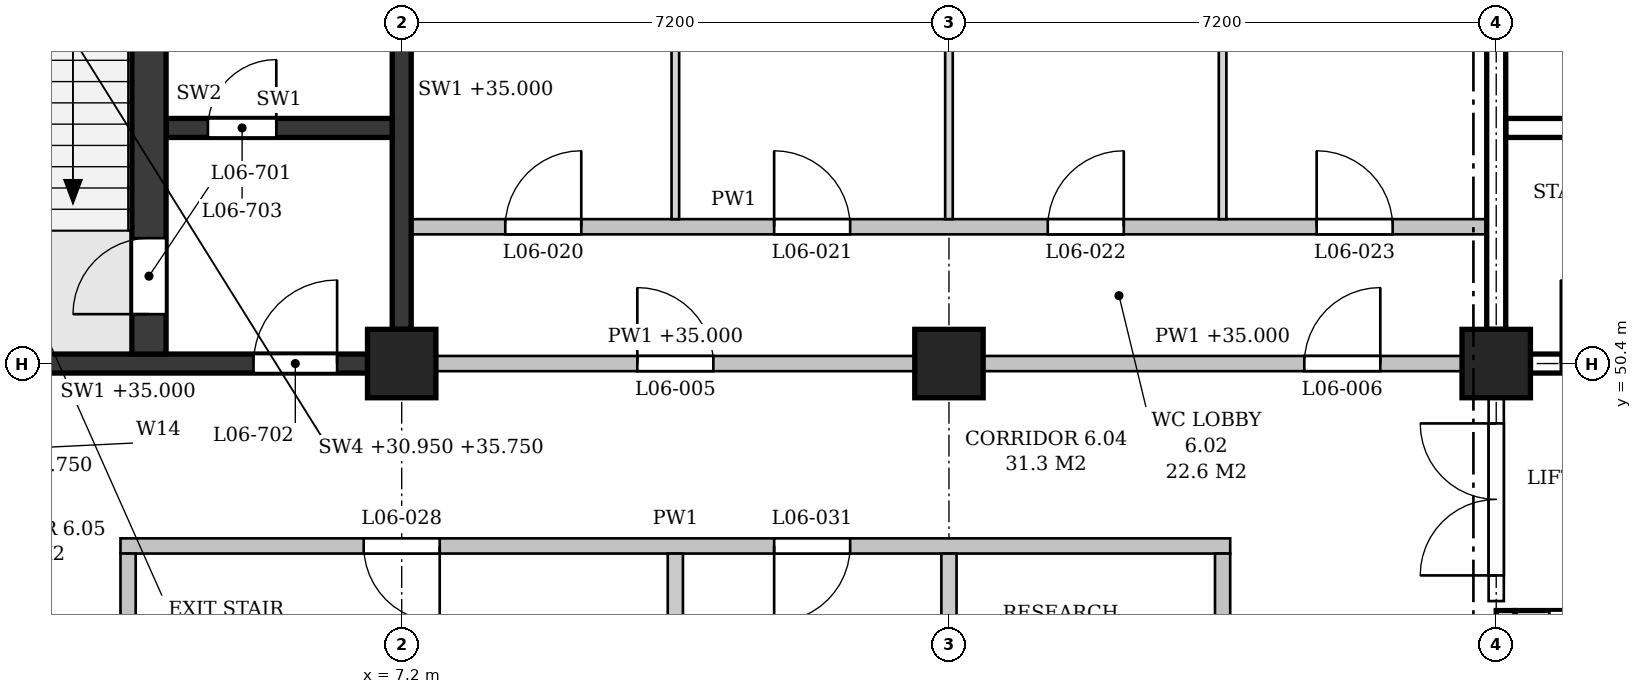
"""IFC4 building model, lengths in metres.
Left out: names, types, materials, properties, quantities, classifications, styles, units other than length and angle.
Written with IfcOpenShell. Run it as: python <this file> out.ifc"""

import sys

from ifc_helpers import new_model, si_unit, direction, frame, frame_2d, origin, origin_2d, place, context, subcontext, project, spatial, polyline, rectangle, outline, extrude, element, fill, save


model = new_model("IFC4")
c1 = context("Model", 3, precision=1e-05, world=origin(), true_north=direction((0.0, 1.0)))
c2 = subcontext(c1, "Body", "Model", "MODEL_VIEW")
j1 = project(units=[si_unit("LENGTHUNIT", "METRE"), si_unit("PLANEANGLEUNIT", "RADIAN")], contexts=[c1])
p1 = place(None, origin())
s1 = spatial("IfcSite", under=j1, at=p1, CompositionType="ELEMENT")
p2 = place(p1, origin())
s2 = spatial("IfcBuilding", under=s1, at=p2, CompositionType="ELEMENT")
p3 = place(p2, frame((0.0, 0.0, 31.2)))
s3 = spatial("IfcBuildingStorey", under=s2, at=p3, CompositionType="ELEMENT", Elevation=31.2)
for number, where, z_axis, x_axis in (
    (1, (7.2, 50.4, 0.0), (0.0, 0.0, 1.0), (1.0, 0.0, 0.0)),
    (2, (14.4, 50.4, 0.0), (0.0, 0.0, 1.0), (1.0, 0.0, 0.0)),
    (3, (21.6, 50.4, 0.0), (0.0, 0.0, 1.0), (1.0, 0.0, 0.0)),
):
    element("IfcColumn", number, at=place(p3, frame(where, z_axis=z_axis, x_axis=x_axis)), inside=s3, PredefinedType="COLUMN", context=c2, shape_type="SweptSolid", body=[
        extrude(rectangle(XDim=0.9, YDim=0.9, at=origin_2d()), origin(), (0.0, 0.0, 1.0), 4.8),
    ])
p4 = place(p3, frame((0.45, 50.4, 0.0), z_axis=(0.0, 0.0, 1.0), x_axis=(1.0, 0.0, 0.0)))
e4 = element("IfcWall", 4, at=p4, inside=s3, PredefinedType="SHEAR", context=c2, shape_type="SweptSolid", body=[
    extrude(rectangle(XDim=6.3, YDim=0.25, at=frame_2d((3.15, 0.0))), origin(), (0.0, 0.0, 1.0), 3.8),
])
p5 = place(p4, frame((4.8, 0.0, 0.0)))
e5 = element("IfcOpeningElement", 5, at=p5, cuts=e4, PredefinedType="OPENING", context=c2, shape_type="SweptSolid", body=[
    extrude(rectangle(XDim=1.1, YDim=2.1, at=frame_2d((0.55, 1.05))), frame((0.0, 0.135, 0.0), z_axis=(0.0, -1.0, 0.0), x_axis=(1.0, 0.0, 0.0)), (0.0, 0.0, 1.0), 0.27),
])
p6 = place(p3, frame((7.2, 50.85, 0.0), z_axis=(0.0, 0.0, 1.0), x_axis=(0.0, 1.0, 0.0)))
e6 = element("IfcWall", 6, at=p6, inside=s3, PredefinedType="SHEAR", context=c2, shape_type="SweptSolid", body=[
    extrude(rectangle(XDim=6.3, YDim=0.25, at=frame_2d((3.15, 0.0))), origin(), (0.0, 0.0, 1.0), 3.8),
])
p7 = place(p3, frame((3.875, 50.525, 0.0), z_axis=(0.0, 0.0, 1.0), x_axis=(0.0, 1.0, 0.0)))
e7 = element("IfcWall", 7, at=p7, inside=s3, PredefinedType="SHEAR", context=c2, shape_type="SweptSolid", body=[
    extrude(rectangle(XDim=6.85, YDim=0.45, at=frame_2d((3.425, 0.0))), origin(), (0.0, 0.0, 1.0), 4.55),
])
p8 = place(p7, frame((0.525, 0.0, 0.0)))
e8 = element("IfcOpeningElement", 8, at=p8, cuts=e7, PredefinedType="OPENING", context=c2, shape_type="SweptSolid", body=[
    extrude(rectangle(XDim=1.0, YDim=2.1, at=frame_2d((0.5, 1.05))), frame((0.0, 0.235, 0.0), z_axis=(0.0, -1.0, 0.0), x_axis=(1.0, 0.0, 0.0)), (0.0, 0.0, 1.0), 0.47),
])
p9 = place(p3, frame((4.1, 53.5, 0.0), z_axis=(0.0, 0.0, 1.0), x_axis=(1.0, 0.0, 0.0)))
e9 = element("IfcWall", 9, at=p9, inside=s3, PredefinedType="SHEAR", context=c2, shape_type="SweptSolid", body=[
    extrude(rectangle(XDim=2.975, YDim=0.25, at=frame_2d((1.487, 0.0))), origin(), (0.0, 0.0, 1.0), 4.55),
])
p10 = place(p9, frame((0.55, 0.0, 0.0)))
e10 = element("IfcOpeningElement", 10, at=p10, cuts=e9, PredefinedType="OPENING", context=c2, shape_type="SweptSolid", body=[
    extrude(rectangle(XDim=0.9, YDim=2.1, at=frame_2d((0.45, 1.05))), frame((0.0, 0.135, 0.0), z_axis=(0.0, -1.0, 0.0), x_axis=(1.0, 0.0, 0.0)), (0.0, 0.0, 1.0), 0.27),
])
p11 = place(p3, frame((22.05, 50.4, 0.0), z_axis=(0.0, 0.0, 1.0), x_axis=(1.0, 0.0, 0.0)))
e11 = element("IfcWall", 11, at=p11, inside=s3, PredefinedType="SHEAR", context=c2, shape_type="SweptSolid", body=[
    extrude(rectangle(XDim=6.3, YDim=0.25, at=frame_2d((3.15, 0.0))), origin(), (0.0, 0.0, 1.0), 3.8),
])
p12 = place(p11, frame((0.4, 0.0, 0.0)))
e12 = element("IfcOpeningElement", 12, at=p12, cuts=e11, PredefinedType="OPENING", context=c2, shape_type="SweptSolid", body=[
    extrude(rectangle(XDim=1.1, YDim=2.1, at=frame_2d((0.55, 1.05))), frame((0.0, 0.135, 0.0), z_axis=(0.0, -1.0, 0.0), x_axis=(1.0, 0.0, 0.0)), (0.0, 0.0, 1.0), 0.27),
])
p13 = place(p3, frame((21.6, 50.85, 0.0), z_axis=(0.0, 0.0, 1.0), x_axis=(0.0, 1.0, 0.0)))
e13 = element("IfcWall", 13, at=p13, inside=s3, PredefinedType="SHEAR", context=c2, shape_type="SweptSolid", body=[
    extrude(rectangle(XDim=6.3, YDim=0.25, at=frame_2d((3.15, 0.0))), origin(), (0.0, 0.0, 1.0), 3.8),
])
p14 = place(p3, frame((21.725, 53.5, 0.0), z_axis=(0.0, 0.0, 1.0), x_axis=(1.0, 0.0, 0.0)))
e14 = element("IfcWall", 14, at=p14, inside=s3, PredefinedType="SHEAR", context=c2, shape_type="SweptSolid", body=[
    extrude(rectangle(XDim=2.975, YDim=0.25, at=frame_2d((1.487, 0.0))), origin(), (0.0, 0.0, 1.0), 4.55),
])
p15 = place(p14, frame((1.525, 0.0, 0.0)))
e15 = element("IfcOpeningElement", 15, at=p15, cuts=e14, PredefinedType="OPENING", context=c2, shape_type="SweptSolid", body=[
    extrude(rectangle(XDim=0.9, YDim=2.1, at=frame_2d((0.45, 1.05))), frame((0.0, 0.135, 0.0), z_axis=(0.0, -1.0, 0.0), x_axis=(1.0, 0.0, 0.0)), (0.0, 0.0, 1.0), 0.27),
])
p16 = place(p3, frame((21.725, 43.65, -0.25), z_axis=(0.0, 0.0, 1.0), x_axis=(0.0, 1.0, 0.0)))
e16 = element("IfcWall", 16, at=p16, inside=s3, PredefinedType="SHEAR", context=c2, shape_type="SweptSolid", body=[
    extrude(rectangle(XDim=3.5, YDim=0.25, at=frame_2d((1.75, 0.0))), origin(), (0.0, 0.0, 1.0), 4.05),
])
p17 = place(p3, frame((21.85, 47.025, -0.25), z_axis=(0.0, 0.0, 1.0), x_axis=(1.0, 0.0, 0.0)))
e17 = element("IfcWall", 17, at=p17, inside=s3, PredefinedType="SHEAR", context=c2, shape_type="SweptSolid", body=[
    extrude(rectangle(XDim=2.0, YDim=0.25, at=frame_2d((1.0, 0.0))), origin(), (0.0, 0.0, 1.0), 4.8),
])
p18 = place(p17, frame((0.45, 0.0, 0.25)))
e18 = element("IfcOpeningElement", 18, at=p18, cuts=e17, PredefinedType="OPENING", context=c2, shape_type="SweptSolid", body=[
    extrude(rectangle(XDim=1.1, YDim=2.1, at=frame_2d((0.55, 1.05))), frame((0.0, 0.135, 0.0), z_axis=(0.0, -1.0, 0.0), x_axis=(1.0, 0.0, 0.0)), (0.0, 0.0, 1.0), 0.27),
])
p19 = place(p3, frame((3.5, 48.0, 0.0), z_axis=(0.0, 0.0, 1.0), x_axis=(1.0, 0.0, 0.0)))
e19 = element("IfcWall", 19, at=p19, inside=s3, PredefinedType="PARTITIONING", context=c2, shape_type="SweptSolid", body=[
    extrude(outline(polyline([(0.0, 0.0), (14.6, 0.0), (14.6, 4.55), (11.15, 4.55), (11.15, 3.8), (10.65, 3.8), (10.65, 4.55), (3.95, 4.55), (3.95, 3.8), (3.45, 3.8), (3.45, 4.55), (0.0, 4.55), (0.0, 0.0)])), frame((0.0, 0.1, 0.0), z_axis=(0.0, -1.0, 0.0), x_axis=(1.0, 0.0, 0.0)), (0.0, 0.0, 1.0), 0.2),
])
p20 = place(p19, frame((3.2, 0.0, 0.0)))
e20 = element("IfcOpeningElement", 20, at=p20, cuts=e19, PredefinedType="OPENING", context=c2, shape_type="SweptSolid", body=[
    extrude(rectangle(XDim=1.0, YDim=2.1, at=frame_2d((0.5, 1.05))), frame((0.0, 0.11, 0.0), z_axis=(0.0, -1.0, 0.0), x_axis=(1.0, 0.0, 0.0)), (0.0, 0.0, 1.0), 0.22),
])
p21 = place(p19, frame((8.6, 0.0, 0.0)))
e21 = element("IfcOpeningElement", 21, at=p21, cuts=e19, PredefinedType="OPENING", context=c2, shape_type="SweptSolid", body=[
    extrude(rectangle(XDim=1.0, YDim=2.1, at=frame_2d((0.5, 1.05))), frame((0.0, 0.11, 0.0), z_axis=(0.0, -1.0, 0.0), x_axis=(1.0, 0.0, 0.0)), (0.0, 0.0, 1.0), 0.22),
])
p22 = place(p3, frame((7.65, 50.4, 0.0), z_axis=(0.0, 0.0, 1.0), x_axis=(1.0, 0.0, 0.0)))
e22 = element("IfcWall", 22, at=p22, inside=s3, PredefinedType="PARTITIONING", context=c2, shape_type="SweptSolid", body=[
    extrude(rectangle(XDim=6.3, YDim=0.2, at=frame_2d((3.15, 0.0))), origin(), (0.0, 0.0, 1.0), 3.8),
])
p23 = place(p22, frame((2.65, 0.0, 0.0)))
e23 = element("IfcOpeningElement", 23, at=p23, cuts=e22, PredefinedType="OPENING", context=c2, shape_type="SweptSolid", body=[
    extrude(rectangle(XDim=1.0, YDim=2.1, at=frame_2d((0.5, 1.05))), frame((0.0, 0.11, 0.0), z_axis=(0.0, -1.0, 0.0), x_axis=(1.0, 0.0, 0.0)), (0.0, 0.0, 1.0), 0.22),
])
p24 = place(p3, frame((14.85, 50.4, 0.0), z_axis=(0.0, 0.0, 1.0), x_axis=(1.0, 0.0, 0.0)))
e24 = element("IfcWall", 24, at=p24, inside=s3, PredefinedType="PARTITIONING", context=c2, shape_type="SweptSolid", body=[
    extrude(rectangle(XDim=6.3, YDim=0.2, at=frame_2d((3.15, 0.0))), origin(), (0.0, 0.0, 1.0), 3.8),
])
p25 = place(p24, frame((4.225, 0.0, 0.0)))
e25 = element("IfcOpeningElement", 25, at=p25, cuts=e24, PredefinedType="OPENING", context=c2, shape_type="SweptSolid", body=[
    extrude(rectangle(XDim=1.0, YDim=2.1, at=frame_2d((0.5, 1.05))), frame((0.0, 0.11, 0.0), z_axis=(0.0, -1.0, 0.0), x_axis=(1.0, 0.0, 0.0)), (0.0, 0.0, 1.0), 0.22),
])
p26 = place(p3, frame((7.325, 52.2, 0.0), z_axis=(0.0, 0.0, 1.0), x_axis=(1.0, 0.0, 0.0)))
e26 = element("IfcWall", 26, at=p26, inside=s3, PredefinedType="PARTITIONING", context=c2, shape_type="SweptSolid", body=[
    extrude(outline(polyline([(0.0, 0.0), (14.15, 0.0), (14.15, 3.8), (14.025, 3.8), (14.025, 4.55), (7.325, 4.55), (7.325, 3.8), (6.825, 3.8), (6.825, 4.55), (0.125, 4.55), (0.125, 3.8), (0.0, 3.8), (0.0, 0.0)])), frame((0.0, 0.1, 0.0), z_axis=(0.0, -1.0, 0.0), x_axis=(1.0, 0.0, 0.0)), (0.0, 0.0, 1.0), 0.2),
])
p27 = place(p26, frame((1.238, 0.0, 0.0)))
e27 = element("IfcOpeningElement", 27, at=p27, cuts=e26, PredefinedType="OPENING", context=c2, shape_type="SweptSolid", body=[
    extrude(rectangle(XDim=1.0, YDim=2.1, at=frame_2d((0.5, 1.05))), frame((0.0, 0.11, 0.0), z_axis=(0.0, -1.0, 0.0), x_axis=(1.0, 0.0, 0.0)), (0.0, 0.0, 1.0), 0.22),
])
p28 = place(p26, frame((4.775, 0.0, 0.0)))
e28 = element("IfcOpeningElement", 28, at=p28, cuts=e26, PredefinedType="OPENING", context=c2, shape_type="SweptSolid", body=[
    extrude(rectangle(XDim=1.0, YDim=2.1, at=frame_2d((0.5, 1.05))), frame((0.0, 0.11, 0.0), z_axis=(0.0, -1.0, 0.0), x_axis=(1.0, 0.0, 0.0)), (0.0, 0.0, 1.0), 0.22),
])
p29 = place(p26, frame((8.375, 0.0, 0.0)))
e29 = element("IfcOpeningElement", 29, at=p29, cuts=e26, PredefinedType="OPENING", context=c2, shape_type="SweptSolid", body=[
    extrude(rectangle(XDim=1.0, YDim=2.1, at=frame_2d((0.5, 1.05))), frame((0.0, 0.11, 0.0), z_axis=(0.0, -1.0, 0.0), x_axis=(1.0, 0.0, 0.0)), (0.0, 0.0, 1.0), 0.22),
])
p30 = place(p26, frame((11.913, 0.0, 0.0)))
e30 = element("IfcOpeningElement", 30, at=p30, cuts=e26, PredefinedType="OPENING", context=c2, shape_type="SweptSolid", body=[
    extrude(rectangle(XDim=1.0, YDim=2.1, at=frame_2d((0.5, 1.05))), frame((0.0, 0.11, 0.0), z_axis=(0.0, -1.0, 0.0), x_axis=(1.0, 0.0, 0.0)), (0.0, 0.0, 1.0), 0.22),
])
p31 = place(p3, frame((3.6, 46.8, 0.0), z_axis=(0.0, 0.0, 1.0), x_axis=(0.0, 1.0, 0.0)))
e31 = element("IfcWall", 31, at=p31, inside=s3, PredefinedType="PARTITIONING", context=c2, shape_type="SweptSolid", body=[
    extrude(rectangle(XDim=1.1, YDim=0.2, at=frame_2d((0.55, 0.0))), origin(), (0.0, 0.0, 1.0), 4.55),
])
p32 = place(p3, frame((10.8, 36.15, 0.0), z_axis=(0.0, 0.0, 1.0), x_axis=(0.0, 1.0, 0.0)))
e32 = element("IfcWall", 32, at=p32, inside=s3, PredefinedType="PARTITIONING", context=c2, shape_type="SweptSolid", body=[
    extrude(outline(polyline([(0.0, 0.0), (11.75, 0.0), (11.75, 4.55), (7.3, 4.55), (7.3, 3.8), (6.8, 3.8), (6.8, 4.55), (0.1, 4.55), (0.1, 3.95), (0.0, 3.95), (0.0, 0.0)])), frame((0.0, 0.1, 0.0), z_axis=(0.0, -1.0, 0.0), x_axis=(1.0, 0.0, 0.0)), (0.0, 0.0, 1.0), 0.2),
])
p33 = place(p3, frame((10.8, 52.3, 0.0), z_axis=(0.0, 0.0, 1.0), x_axis=(0.0, 1.0, 0.0)))
e33 = element("IfcWall", 33, at=p33, inside=s3, PredefinedType="PARTITIONING", context=c2, shape_type="SweptSolid", body=[
    extrude(rectangle(XDim=5.15, YDim=0.1, at=frame_2d((2.575, 0.0))), origin(), (0.0, 0.0, 1.0), 3.8),
])
p34 = place(p3, frame((14.4, 43.65, 0.0), z_axis=(0.0, 0.0, 1.0), x_axis=(0.0, 1.0, 0.0)))
e34 = element("IfcWall", 34, at=p34, inside=s3, PredefinedType="PARTITIONING", context=c2, shape_type="SweptSolid", body=[
    extrude(rectangle(XDim=4.25, YDim=0.2, at=frame_2d((2.125, 0.0))), origin(), (0.0, 0.0, 1.0), 3.8),
])
p35 = place(p3, frame((14.4, 52.3, 0.0), z_axis=(0.0, 0.0, 1.0), x_axis=(0.0, 1.0, 0.0)))
e35 = element("IfcWall", 35, at=p35, inside=s3, PredefinedType="PARTITIONING", context=c2, shape_type="SweptSolid", body=[
    extrude(rectangle(XDim=4.85, YDim=0.1, at=frame_2d((2.425, 0.0))), origin(), (0.0, 0.0, 1.0), 3.8),
])
p36 = place(p3, frame((18.0, 40.9, 0.0), z_axis=(0.0, 0.0, 1.0), x_axis=(0.0, 1.0, 0.0)))
e36 = element("IfcWall", 36, at=p36, inside=s3, PredefinedType="PARTITIONING", context=c2, shape_type="SweptSolid", body=[
    extrude(outline(polyline([(0.0, 0.0), (7.0, 0.0), (7.0, 4.55), (2.55, 4.55), (2.55, 3.8), (2.05, 3.8), (2.05, 4.55), (0.0, 4.55), (0.0, 0.0)])), frame((0.0, 0.1, 0.0), z_axis=(0.0, -1.0, 0.0), x_axis=(1.0, 0.0, 0.0)), (0.0, 0.0, 1.0), 0.2),
])
p37 = place(p36, frame((3.0, 0.0, 0.0)))
e37 = element("IfcOpeningElement", 37, at=p37, cuts=e36, PredefinedType="OPENING", context=c2, shape_type="SweptSolid", body=[
    extrude(rectangle(XDim=1.0, YDim=2.1, at=frame_2d((0.5, 1.05))), frame((0.0, 0.11, 0.0), z_axis=(0.0, -1.0, 0.0), x_axis=(1.0, 0.0, 0.0)), (0.0, 0.0, 1.0), 0.22),
])
p38 = place(p3, frame((18.0, 52.3, 0.0), z_axis=(0.0, 0.0, 1.0), x_axis=(0.0, 1.0, 0.0)))
e38 = element("IfcWall", 38, at=p38, inside=s3, PredefinedType="PARTITIONING", context=c2, shape_type="SweptSolid", body=[
    extrude(rectangle(XDim=5.15, YDim=0.1, at=frame_2d((2.575, 0.0))), origin(), (0.0, 0.0, 1.0), 3.8),
])
p39 = place(p3, frame((21.6, 47.275, 0.0), z_axis=(0.0, 0.0, 1.0), x_axis=(0.0, 1.0, 0.0)))
e39 = element("IfcWall", 39, at=p39, inside=s3, PredefinedType="PARTITIONING", context=c2, shape_type="SweptSolid", body=[
    extrude(rectangle(XDim=2.675, YDim=0.2, at=frame_2d((1.337, 0.0))), origin(), (0.0, 0.0, 1.0), 3.8),
])
p40 = place(p39, frame((0.337, 0.0, 0.0)))
e40 = element("IfcOpeningElement", 40, at=p40, cuts=e39, PredefinedType="OPENING", context=c2, shape_type="SweptSolid", body=[
    extrude(rectangle(XDim=2.0, YDim=2.4, at=frame_2d((1.0, 1.2))), frame((0.0, 0.11, 0.0), z_axis=(0.0, -1.0, 0.0), x_axis=(1.0, 0.0, 0.0)), (0.0, 0.0, 1.0), 0.22),
])
p41 = place(p8, origin())
e41 = element("IfcDoor", 41, at=p41, inside=s3, OperationType="SINGLE_SWING_LEFT", PredefinedType="DOOR", context=c2, shape_type="SweptSolid", body=[
    extrude(rectangle(XDim=1.0, YDim=2.1, at=frame_2d((0.5, 1.05))), frame((0.0, 0.025, 0.0), z_axis=(0.0, -1.0, 0.0), x_axis=(1.0, 0.0, 0.0)), (0.0, 0.0, 1.0), 0.05),
])
fill(e8, e41)
p42 = place(p5, origin())
e42 = element("IfcDoor", 42, at=p42, inside=s3, OperationType="SINGLE_SWING_RIGHT", PredefinedType="DOOR", context=c2, shape_type="SweptSolid", body=[
    extrude(rectangle(XDim=1.1, YDim=2.1, at=frame_2d((0.55, 1.05))), frame((0.0, 0.025, 0.0), z_axis=(0.0, -1.0, 0.0), x_axis=(1.0, 0.0, 0.0)), (0.0, 0.0, 1.0), 0.05),
])
fill(e5, e42)
p43 = place(p10, origin())
e43 = element("IfcDoor", 43, at=p43, inside=s3, OperationType="SINGLE_SWING_RIGHT", PredefinedType="DOOR", context=c2, shape_type="SweptSolid", body=[
    extrude(rectangle(XDim=0.9, YDim=2.1, at=frame_2d((0.45, 1.05))), frame((0.0, 0.025, 0.0), z_axis=(0.0, -1.0, 0.0), x_axis=(1.0, 0.0, 0.0)), (0.0, 0.0, 1.0), 0.05),
])
fill(e10, e43)
p44 = place(p12, origin())
e44 = element("IfcDoor", 44, at=p44, inside=s3, OperationType="SINGLE_SWING_LEFT", PredefinedType="DOOR", context=c2, shape_type="SweptSolid", body=[
    extrude(rectangle(XDim=1.1, YDim=2.1, at=frame_2d((0.55, 1.05))), frame((0.0, 0.025, 0.0), z_axis=(0.0, -1.0, 0.0), x_axis=(1.0, 0.0, 0.0)), (0.0, 0.0, 1.0), 0.05),
])
fill(e12, e44)
p45 = place(p40, origin())
e45 = element("IfcDoor", 45, at=p45, inside=s3, OperationType="DOUBLE_DOOR_SINGLE_SWING", PredefinedType="DOOR", context=c2, shape_type="SweptSolid", body=[
    extrude(rectangle(XDim=2.0, YDim=2.4, at=frame_2d((1.0, 1.2))), frame((0.0, 0.025, 0.0), z_axis=(0.0, -1.0, 0.0), x_axis=(1.0, 0.0, 0.0)), (0.0, 0.0, 1.0), 0.05),
])
fill(e40, e45)
p46 = place(p23, origin())
e46 = element("IfcDoor", 46, at=p46, inside=s3, OperationType="SINGLE_SWING_LEFT", PredefinedType="DOOR", context=c2, shape_type="SweptSolid", body=[
    extrude(rectangle(XDim=1.0, YDim=2.1, at=frame_2d((0.5, 1.05))), frame((0.0, 0.025, 0.0), z_axis=(0.0, -1.0, 0.0), x_axis=(1.0, 0.0, 0.0)), (0.0, 0.0, 1.0), 0.05),
])
fill(e23, e46)
p47 = place(p25, origin())
e47 = element("IfcDoor", 47, at=p47, inside=s3, OperationType="SINGLE_SWING_RIGHT", PredefinedType="DOOR", context=c2, shape_type="SweptSolid", body=[
    extrude(rectangle(XDim=1.0, YDim=2.1, at=frame_2d((0.5, 1.05))), frame((0.0, 0.025, 0.0), z_axis=(0.0, -1.0, 0.0), x_axis=(1.0, 0.0, 0.0)), (0.0, 0.0, 1.0), 0.05),
])
fill(e25, e47)
p48 = place(p27, origin())
e48 = element("IfcDoor", 48, at=p48, inside=s3, OperationType="SINGLE_SWING_RIGHT", PredefinedType="DOOR", context=c2, shape_type="SweptSolid", body=[
    extrude(rectangle(XDim=1.0, YDim=2.1, at=frame_2d((0.5, 1.05))), frame((0.0, 0.025, 0.0), z_axis=(0.0, -1.0, 0.0), x_axis=(1.0, 0.0, 0.0)), (0.0, 0.0, 1.0), 0.05),
])
fill(e27, e48)
p49 = place(p28, origin())
e49 = element("IfcDoor", 49, at=p49, inside=s3, OperationType="SINGLE_SWING_LEFT", PredefinedType="DOOR", context=c2, shape_type="SweptSolid", body=[
    extrude(rectangle(XDim=1.0, YDim=2.1, at=frame_2d((0.5, 1.05))), frame((0.0, 0.025, 0.0), z_axis=(0.0, -1.0, 0.0), x_axis=(1.0, 0.0, 0.0)), (0.0, 0.0, 1.0), 0.05),
])
fill(e28, e49)
p50 = place(p29, origin())
e50 = element("IfcDoor", 50, at=p50, inside=s3, OperationType="SINGLE_SWING_RIGHT", PredefinedType="DOOR", context=c2, shape_type="SweptSolid", body=[
    extrude(rectangle(XDim=1.0, YDim=2.1, at=frame_2d((0.5, 1.05))), frame((0.0, 0.025, 0.0), z_axis=(0.0, -1.0, 0.0), x_axis=(1.0, 0.0, 0.0)), (0.0, 0.0, 1.0), 0.05),
])
fill(e29, e50)
p51 = place(p30, origin())
e51 = element("IfcDoor", 51, at=p51, inside=s3, OperationType="SINGLE_SWING_LEFT", PredefinedType="DOOR", context=c2, shape_type="SweptSolid", body=[
    extrude(rectangle(XDim=1.0, YDim=2.1, at=frame_2d((0.5, 1.05))), frame((0.0, 0.025, 0.0), z_axis=(0.0, -1.0, 0.0), x_axis=(1.0, 0.0, 0.0)), (0.0, 0.0, 1.0), 0.05),
])
fill(e30, e51)
p52 = place(p20, frame((1.0, 0.0, 0.0), z_axis=(0.0, 0.0, 1.0), x_axis=(-1.0, 0.0, 0.0)))
e52 = element("IfcDoor", 52, at=p52, inside=s3, OperationType="SINGLE_SWING_LEFT", PredefinedType="DOOR", context=c2, shape_type="SweptSolid", body=[
    extrude(rectangle(XDim=1.0, YDim=2.1, at=frame_2d((0.5, 1.05))), frame((0.0, 0.025, 0.0), z_axis=(0.0, -1.0, 0.0), x_axis=(1.0, 0.0, 0.0)), (0.0, 0.0, 1.0), 0.05),
])
fill(e20, e52)
p53 = place(p21, frame((1.0, 0.0, 0.0), z_axis=(0.0, 0.0, 1.0), x_axis=(-1.0, 0.0, 0.0)))
e53 = element("IfcDoor", 53, at=p53, inside=s3, OperationType="SINGLE_SWING_RIGHT", PredefinedType="DOOR", context=c2, shape_type="SweptSolid", body=[
    extrude(rectangle(XDim=1.0, YDim=2.1, at=frame_2d((0.5, 1.05))), frame((0.0, 0.025, 0.0), z_axis=(0.0, -1.0, 0.0), x_axis=(1.0, 0.0, 0.0)), (0.0, 0.0, 1.0), 0.05),
])
fill(e21, e53)
save(model, sys.argv[1])
